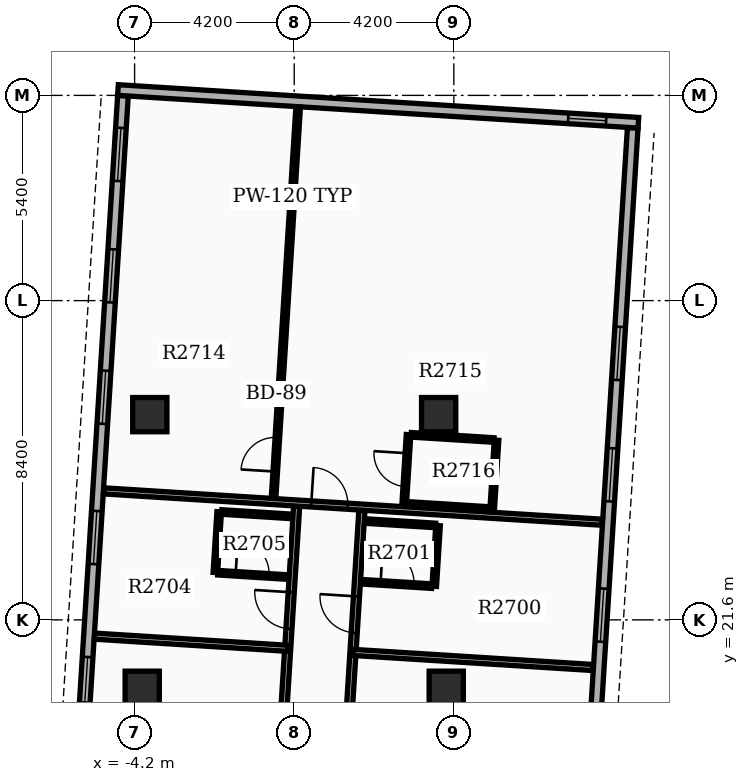
"""IFC4 building model, lengths in metres.
Left out: names, types, materials, properties, quantities, classifications, styles, units other than length and angle.
Written with IfcOpenShell. Run it as: python <this file> out.ifc"""

import sys

from ifc_helpers import new_model, si_unit, direction, frame, frame_2d, origin, origin_2d, place, context, subcontext, project, spatial, rectangle, extrude, element, fill, save


model = new_model("IFC4")
c1 = context("Model", 3, precision=1e-05, world=origin(), true_north=direction((0.0, 1.0)))
c2 = subcontext(c1, "Body", "Model", "MODEL_VIEW")
j1 = project(units=[si_unit("LENGTHUNIT", "METRE"), si_unit("PLANEANGLEUNIT", "RADIAN")], contexts=[c1])
p1 = place(None, origin())
s1 = spatial("IfcSite", under=j1, at=p1, CompositionType="ELEMENT")
p2 = place(p1, origin())
s2 = spatial("IfcBuilding", under=s1, at=p2, CompositionType="ELEMENT")
p3 = place(p2, frame((0.0, 0.0, 168.3)))
s3 = spatial("IfcBuildingStorey", under=s2, at=p3, CompositionType="ELEMENT", Elevation=168.3)
for number, where, z_axis, x_axis in (
    (1, (-4.0, 19.8, 0.0), (0.0, 0.0, 1.0), (1.0, 0.0, 0.0)),
    (2, (4.0, 19.8, 0.0), (0.0, 0.0, 1.0), (1.0, 0.0, 0.0)),
    (3, (-3.8, 27.0, 0.0), (0.0, 0.0, 1.0), (1.0, 0.0, 0.0)),
    (4, (3.8, 27.0, 0.0), (0.0, 0.0, 1.0), (1.0, 0.0, 0.0)),
):
    element("IfcColumn", number, at=place(p3, frame(where, z_axis=z_axis, x_axis=x_axis)), inside=s3, PredefinedType="COLUMN", context=c2, shape_type="SweptSolid", body=[
        extrude(rectangle(XDim=0.9, YDim=0.9, at=origin_2d()), origin(), (0.0, 0.0, 1.0), 3.9),
    ])
p4 = place(p3, frame((7.645, 14.489, 0.0), z_axis=(0.0, 0.0, 1.0), x_axis=(0.06279645424, 0.99802635503, 0.0)))
e5 = element("IfcWall", 5, at=p4, inside=s3, PredefinedType="STANDARD", context=c2, shape_type="SweptSolid", body=[
    extrude(rectangle(XDim=20.1, YDim=0.28, at=frame_2d((10.05, 0.0))), origin(), (0.0, 0.0, 1.0), 2.97),
])
p5 = place(p4, frame((0.85, 0.0, 0.8)))
e6 = element("IfcOpeningElement", 6, at=p5, cuts=e5, PredefinedType="OPENING", context=c2, shape_type="SweptSolid", body=[
    extrude(rectangle(XDim=1.4, YDim=1.6, at=frame_2d((0.7, 0.8))), frame((0.0, 0.15, 0.0), z_axis=(0.0, -1.0, 0.0), x_axis=(1.0, 0.0, 0.0)), (0.0, 0.0, 1.0), 0.3),
])
p6 = place(p4, frame((6.55, 0.0, 0.8)))
e7 = element("IfcOpeningElement", 7, at=p6, cuts=e5, PredefinedType="OPENING", context=c2, shape_type="SweptSolid", body=[
    extrude(rectangle(XDim=1.4, YDim=1.6, at=frame_2d((0.7, 0.8))), frame((0.0, 0.15, 0.0), z_axis=(0.0, -1.0, 0.0), x_axis=(1.0, 0.0, 0.0)), (0.0, 0.0, 1.0), 0.3),
])
p7 = place(p4, frame((10.25, 0.0, 0.8)))
e8 = element("IfcOpeningElement", 8, at=p7, cuts=e5, PredefinedType="OPENING", context=c2, shape_type="SweptSolid", body=[
    extrude(rectangle(XDim=1.4, YDim=1.6, at=frame_2d((0.7, 0.8))), frame((0.0, 0.15, 0.0), z_axis=(0.0, -1.0, 0.0), x_axis=(1.0, 0.0, 0.0)), (0.0, 0.0, 1.0), 0.3),
])
p8 = place(p4, frame((13.45, 0.0, 0.8)))
e9 = element("IfcOpeningElement", 9, at=p8, cuts=e5, PredefinedType="OPENING", context=c2, shape_type="SweptSolid", body=[
    extrude(rectangle(XDim=1.4, YDim=1.6, at=frame_2d((0.7, 0.8))), frame((0.0, 0.15, 0.0), z_axis=(0.0, -1.0, 0.0), x_axis=(1.0, 0.0, 0.0)), (0.0, 0.0, 1.0), 0.3),
])
p9 = place(p3, frame((-4.507, 35.393, 0.0), z_axis=(0.0, 0.0, 1.0), x_axis=(-0.062784355807, -0.998027116198, 0.0)))
e10 = element("IfcWall", 10, at=p9, inside=s3, PredefinedType="STANDARD", context=c2, shape_type="SweptSolid", body=[
    extrude(rectangle(XDim=20.1, YDim=0.28, at=frame_2d((10.05, 0.0))), origin(), (0.0, 0.0, 1.0), 2.97),
])
p10 = place(p9, frame((0.85, 0.0, 0.8)))
e11 = element("IfcOpeningElement", 11, at=p10, cuts=e10, PredefinedType="OPENING", context=c2, shape_type="SweptSolid", body=[
    extrude(rectangle(XDim=1.4, YDim=1.6, at=frame_2d((0.7, 0.8))), frame((0.0, 0.15, 0.0), z_axis=(0.0, -1.0, 0.0), x_axis=(1.0, 0.0, 0.0)), (0.0, 0.0, 1.0), 0.3),
])
p11 = place(p9, frame((4.05, 0.0, 0.8)))
e12 = element("IfcOpeningElement", 12, at=p11, cuts=e10, PredefinedType="OPENING", context=c2, shape_type="SweptSolid", body=[
    extrude(rectangle(XDim=1.4, YDim=1.6, at=frame_2d((0.7, 0.8))), frame((0.0, 0.15, 0.0), z_axis=(0.0, -1.0, 0.0), x_axis=(1.0, 0.0, 0.0)), (0.0, 0.0, 1.0), 0.3),
])
p12 = place(p9, frame((7.25, 0.0, 0.8)))
e13 = element("IfcOpeningElement", 13, at=p12, cuts=e10, PredefinedType="OPENING", context=c2, shape_type="SweptSolid", body=[
    extrude(rectangle(XDim=1.4, YDim=1.6, at=frame_2d((0.7, 0.8))), frame((0.0, 0.15, 0.0), z_axis=(0.0, -1.0, 0.0), x_axis=(1.0, 0.0, 0.0)), (0.0, 0.0, 1.0), 0.3),
])
p13 = place(p9, frame((10.95, 0.0, 0.8)))
e14 = element("IfcOpeningElement", 14, at=p13, cuts=e10, PredefinedType="OPENING", context=c2, shape_type="SweptSolid", body=[
    extrude(rectangle(XDim=1.4, YDim=1.6, at=frame_2d((0.7, 0.8))), frame((0.0, 0.15, 0.0), z_axis=(0.0, -1.0, 0.0), x_axis=(1.0, 0.0, 0.0)), (0.0, 0.0, 1.0), 0.3),
])
p14 = place(p9, frame((14.799, 0.0, 0.85)))
e15 = element("IfcOpeningElement", 15, at=p14, cuts=e10, PredefinedType="OPENING", context=c2, shape_type="SweptSolid", body=[
    extrude(rectangle(XDim=1.2, YDim=1.6, at=frame_2d((0.6, 0.8))), frame((0.0, 0.15, 0.0), z_axis=(0.0, -1.0, 0.0), x_axis=(1.0, 0.0, 0.0)), (0.0, 0.0, 1.0), 0.3),
])
p15 = place(p3, frame((9.055, 34.68, 0.0), z_axis=(0.0, 0.0, 1.0), x_axis=(-0.998026318072, 0.062797041623, 0.0)))
e16 = element("IfcWall", 16, at=p15, inside=s3, PredefinedType="STANDARD", context=c2, shape_type="SweptSolid", body=[
    extrude(rectangle(XDim=13.72, YDim=0.28, at=frame_2d((6.86, 0.0))), origin(), (0.0, 0.0, 1.0), 2.97),
])
p16 = place(p15, frame((0.85, 0.0, 0.85)))
e17 = element("IfcOpeningElement", 17, at=p16, cuts=e16, PredefinedType="OPENING", context=c2, shape_type="SweptSolid", body=[
    extrude(rectangle(XDim=1.0, YDim=1.5, at=frame_2d((0.5, 0.75))), frame((0.0, 0.15, 0.0), z_axis=(0.0, -1.0, 0.0), x_axis=(1.0, 0.0, 0.0)), (0.0, 0.0, 1.0), 0.3),
])
p17 = place(p3, frame((1.172, 14.806, 0.0), z_axis=(0.0, 0.0, 1.0), x_axis=(0.062771584278, 0.998027919553, 0.0)))
e18 = element("IfcWall", 18, at=p17, inside=s3, PredefinedType="PARTITIONING", context=c2, shape_type="SweptSolid", body=[
    extrude(rectangle(XDim=9.7, YDim=0.16, at=frame_2d((4.85, 0.0))), origin(), (0.0, 0.0, 1.0), 2.96),
])
p18 = place(p17, frame((2.575, 0.0, 0.0)))
e19 = element("IfcOpeningElement", 19, at=p18, cuts=e18, PredefinedType="OPENING", context=c2, shape_type="SweptSolid", body=[
    extrude(rectangle(XDim=0.96, YDim=2.15, at=frame_2d((0.48, 1.075))), frame((0.0, 0.09, 0.0), z_axis=(0.0, -1.0, 0.0), x_axis=(1.0, 0.0, 0.0)), (0.0, 0.0, 1.0), 0.18),
])
p19 = place(p17, frame((6.467, 0.0, 0.0)))
e20 = element("IfcOpeningElement", 20, at=p19, cuts=e18, PredefinedType="OPENING", context=c2, shape_type="SweptSolid", body=[
    extrude(rectangle(XDim=0.96, YDim=2.15, at=frame_2d((0.48, 1.075))), frame((0.0, 0.09, 0.0), z_axis=(0.0, -1.0, 0.0), x_axis=(1.0, 0.0, 0.0)), (0.0, 0.0, 1.0), 0.18),
])
p20 = place(p3, frame((1.546, 20.744, 0.0), z_axis=(0.0, 0.0, 1.0), x_axis=(0.998025479614, -0.06281036572, 0.0)))
e21 = element("IfcWall", 21, at=p20, inside=s3, PredefinedType="PARTITIONING", context=c2, shape_type="SweptSolid", body=[
    extrude(rectangle(XDim=6.332, YDim=0.16, at=frame_2d((3.166, 0.0))), origin(), (0.0, 0.0, 1.0), 2.96),
])
p21 = place(p3, frame((1.803, 22.601, 0.0), z_axis=(0.0, 0.0, 1.0), x_axis=(0.998027443946, -0.062779145668, 0.0)))
e22 = element("IfcWall", 22, at=p21, inside=s3, PredefinedType="PARTITIONING", context=c2, shape_type="SweptSolid", body=[
    extrude(rectangle(XDim=1.82, YDim=0.12, at=frame_2d((0.91, 0.0))), origin(), (0.0, 0.0, 1.0), 2.96),
])
p22 = place(p21, frame((0.47, 0.0, 0.0)))
e23 = element("IfcOpeningElement", 23, at=p22, cuts=e22, PredefinedType="OPENING", context=c2, shape_type="SweptSolid", body=[
    extrude(rectangle(XDim=0.88, YDim=2.1, at=frame_2d((0.44, 1.05))), frame((0.0, 0.07, 0.0), z_axis=(0.0, -1.0, 0.0), x_axis=(1.0, 0.0, 0.0)), (0.0, 0.0, 1.0), 0.14),
])
p23 = place(p3, frame((1.903, 24.198, 0.0), z_axis=(0.0, 0.0, 1.0), x_axis=(0.998026915151, -0.062787551592, 0.0)))
e24 = element("IfcWall", 24, at=p23, inside=s3, PredefinedType="PARTITIONING", context=c2, shape_type="SweptSolid", body=[
    extrude(rectangle(XDim=1.82, YDim=0.12, at=frame_2d((0.91, 0.0))), origin(), (0.0, 0.0, 1.0), 2.96),
])
p24 = place(p3, frame((3.684, 22.483, 0.0), z_axis=(0.0, 0.0, 1.0), x_axis=(0.06271075472, 0.998031743605, 0.0)))
e25 = element("IfcWall", 25, at=p24, inside=s3, PredefinedType="PARTITIONING", context=c2, shape_type="SweptSolid", body=[
    extrude(rectangle(XDim=1.6, YDim=0.12, at=frame_2d((0.8, 0.0))), origin(), (0.0, 0.0, 1.0), 2.96),
])
p25 = place(p3, frame((-0.545, 14.914, 0.0), z_axis=(0.0, 0.0, 1.0), x_axis=(0.062796654085, 0.998026342456, 0.0)))
e26 = element("IfcWall", 26, at=p25, inside=s3, PredefinedType="PARTITIONING", context=c2, shape_type="SweptSolid", body=[
    extrude(rectangle(XDim=9.7, YDim=0.16, at=frame_2d((4.85, 0.0))), origin(), (0.0, 0.0, 1.0), 2.96),
])
p26 = place(p25, frame((2.575, 0.0, 0.0)))
e27 = element("IfcOpeningElement", 27, at=p26, cuts=e26, PredefinedType="OPENING", context=c2, shape_type="SweptSolid", body=[
    extrude(rectangle(XDim=0.96, YDim=2.15, at=frame_2d((0.48, 1.075))), frame((0.0, 0.09, 0.0), z_axis=(0.0, -1.0, 0.0), x_axis=(1.0, 0.0, 0.0)), (0.0, 0.0, 1.0), 0.18),
])
p27 = place(p25, frame((6.467, 0.0, 0.0)))
e28 = element("IfcOpeningElement", 28, at=p27, cuts=e26, PredefinedType="OPENING", context=c2, shape_type="SweptSolid", body=[
    extrude(rectangle(XDim=0.96, YDim=2.15, at=frame_2d((0.48, 1.075))), frame((0.0, 0.09, 0.0), z_axis=(0.0, -1.0, 0.0), x_axis=(1.0, 0.0, 0.0)), (0.0, 0.0, 1.0), 0.18),
])
p28 = place(p3, frame((-0.171, 20.852, 0.0), z_axis=(0.0, 0.0, 1.0), x_axis=(-0.998025621735, 0.06280810744, 0.0)))
e29 = element("IfcWall", 29, at=p28, inside=s3, PredefinedType="PARTITIONING", context=c2, shape_type="SweptSolid", body=[
    extrude(rectangle(XDim=5.092, YDim=0.16, at=frame_2d((2.546, 0.0))), origin(), (0.0, 0.0, 1.0), 2.96),
])
p29 = place(p3, frame((-2.01, 22.841, 0.0), z_axis=(0.0, 0.0, 1.0), x_axis=(0.998027443946, -0.062779145668, 0.0)))
e30 = element("IfcWall", 30, at=p29, inside=s3, PredefinedType="PARTITIONING", context=c2, shape_type="SweptSolid", body=[
    extrude(rectangle(XDim=1.82, YDim=0.12, at=frame_2d((0.91, 0.0))), origin(), (0.0, 0.0, 1.0), 2.96),
])
p30 = place(p29, frame((0.47, 0.0, 0.0)))
e31 = element("IfcOpeningElement", 31, at=p30, cuts=e30, PredefinedType="OPENING", context=c2, shape_type="SweptSolid", body=[
    extrude(rectangle(XDim=0.88, YDim=2.1, at=frame_2d((0.44, 1.05))), frame((0.0, 0.07, 0.0), z_axis=(0.0, -1.0, 0.0), x_axis=(1.0, 0.0, 0.0)), (0.0, 0.0, 1.0), 0.14),
])
p31 = place(p3, frame((-1.909, 24.438, 0.0), z_axis=(0.0, 0.0, 1.0), x_axis=(0.998026915151, -0.062787551592, 0.0)))
e32 = element("IfcWall", 32, at=p31, inside=s3, PredefinedType="PARTITIONING", context=c2, shape_type="SweptSolid", body=[
    extrude(rectangle(XDim=1.82, YDim=0.12, at=frame_2d((0.91, 0.0))), origin(), (0.0, 0.0, 1.0), 2.96),
])
p32 = place(p3, frame((-2.075, 22.845, 0.0), z_axis=(0.0, 0.0, 1.0), x_axis=(0.062862733403, 0.998022182494, 0.0)))
e33 = element("IfcWall", 33, at=p32, inside=s3, PredefinedType="PARTITIONING", context=c2, shape_type="SweptSolid", body=[
    extrude(rectangle(XDim=1.6, YDim=0.12, at=frame_2d((0.8, 0.0))), origin(), (0.0, 0.0, 1.0), 2.96),
])
p33 = place(p3, frame((-5.012, 24.994, 0.0), z_axis=(0.0, 0.0, 1.0), x_axis=(0.998026109115, -0.062800362452, 0.0)))
e34 = element("IfcWall", 34, at=p33, inside=s3, PredefinedType="PARTITIONING", context=c2, shape_type="SweptSolid", body=[
    extrude(rectangle(XDim=13.144, YDim=0.16, at=frame_2d((6.572, 0.0))), origin(), (0.0, 0.0, 1.0), 2.96),
])
p34 = place(p33, frame((5.472, 0.0, 0.0)))
e35 = element("IfcOpeningElement", 35, at=p34, cuts=e34, PredefinedType="OPENING", context=c2, shape_type="SweptSolid", body=[
    extrude(rectangle(XDim=0.96, YDim=2.15, at=frame_2d((0.48, 1.075))), frame((0.0, 0.09, 0.0), z_axis=(0.0, -1.0, 0.0), x_axis=(1.0, 0.0, 0.0)), (0.0, 0.0, 1.0), 0.18),
])
p35 = place(p3, frame((-0.544, 24.803, 0.0), z_axis=(0.0, 0.0, 1.0), x_axis=(0.062786562543, 0.998026977373, 0.0)))
e36 = element("IfcWall", 36, at=p35, inside=s3, PredefinedType="PARTITIONING", context=c2, shape_type="SweptSolid", body=[
    extrude(rectangle(XDim=10.312, YDim=0.12, at=frame_2d((5.156, 0.0))), origin(), (0.0, 0.0, 1.0), 2.96),
])
p36 = place(p35, frame((0.7, 0.0, 0.0)))
e37 = element("IfcOpeningElement", 37, at=p36, cuts=e36, PredefinedType="OPENING", context=c2, shape_type="SweptSolid", body=[
    extrude(rectangle(XDim=0.9, YDim=2.1, at=frame_2d((0.45, 1.05))), frame((0.0, 0.07, 0.0), z_axis=(0.0, -1.0, 0.0), x_axis=(1.0, 0.0, 0.0)), (0.0, 0.0, 1.0), 0.14),
])
p37 = place(p3, frame((2.894, 24.657, 0.0), z_axis=(0.0, 0.0, 1.0), x_axis=(0.062912758763, 0.998019030272, 0.0)))
e38 = element("IfcWall", 38, at=p37, inside=s3, PredefinedType="PARTITIONING", context=c2, shape_type="SweptSolid", body=[
    extrude(rectangle(XDim=1.82, YDim=0.12, at=frame_2d((0.91, 0.0))), origin(), (0.0, 0.0, 1.0), 2.96),
])
p38 = place(p37, frame((0.45, 0.0, 0.0)))
e39 = element("IfcOpeningElement", 39, at=p38, cuts=e38, PredefinedType="OPENING", context=c2, shape_type="SweptSolid", body=[
    extrude(rectangle(XDim=0.88, YDim=2.1, at=frame_2d((0.44, 1.05))), frame((0.0, 0.07, 0.0), z_axis=(0.0, -1.0, 0.0), x_axis=(1.0, 0.0, 0.0)), (0.0, 0.0, 1.0), 0.14),
])
p39 = place(p3, frame((5.209, 24.511, 0.0), z_axis=(0.0, 0.0, 1.0), x_axis=(0.062645529196, 0.998035839873, 0.0)))
e40 = element("IfcWall", 40, at=p39, inside=s3, PredefinedType="PARTITIONING", context=c2, shape_type="SweptSolid", body=[
    extrude(rectangle(XDim=1.82, YDim=0.12, at=frame_2d((0.91, 0.0))), origin(), (0.0, 0.0, 1.0), 2.96),
])
p40 = place(p3, frame((2.964, 24.653, 0.0), z_axis=(0.0, 0.0, 1.0), x_axis=(0.99802414895, -0.06283150573, 0.0)))
e41 = element("IfcWall", 41, at=p40, inside=s3, PredefinedType="PARTITIONING", context=c2, shape_type="SweptSolid", body=[
    extrude(rectangle(XDim=2.18, YDim=0.12, at=frame_2d((1.09, 0.0))), origin(), (0.0, 0.0, 1.0), 2.96),
])
p41 = place(p3, frame((3.078, 26.469, 0.0), z_axis=(0.0, 0.0, 1.0), x_axis=(0.998024591026, -0.062824483344, 0.0)))
e42 = element("IfcWall", 42, at=p41, inside=s3, PredefinedType="PARTITIONING", context=c2, shape_type="SweptSolid", body=[
    extrude(rectangle(XDim=2.18, YDim=0.12, at=frame_2d((1.09, 0.0))), origin(), (0.0, 0.0, 1.0), 2.96),
])
p42 = place(p6, origin())
e43 = element("IfcWindow", 43, at=p42, inside=s3, PartitioningType="SINGLE_PANEL", PredefinedType="WINDOW", context=c2, shape_type="SweptSolid", body=[
    extrude(rectangle(XDim=1.4, YDim=1.6, at=frame_2d((0.7, 0.8))), frame((0.0, 0.03, 0.0), z_axis=(0.0, -1.0, 0.0), x_axis=(1.0, 0.0, 0.0)), (0.0, 0.0, 1.0), 0.06),
])
fill(e7, e43)
p43 = place(p7, origin())
e44 = element("IfcWindow", 44, at=p43, inside=s3, PartitioningType="SINGLE_PANEL", PredefinedType="WINDOW", context=c2, shape_type="SweptSolid", body=[
    extrude(rectangle(XDim=1.4, YDim=1.6, at=frame_2d((0.7, 0.8))), frame((0.0, 0.03, 0.0), z_axis=(0.0, -1.0, 0.0), x_axis=(1.0, 0.0, 0.0)), (0.0, 0.0, 1.0), 0.06),
])
fill(e8, e44)
p44 = place(p8, origin())
e45 = element("IfcWindow", 45, at=p44, inside=s3, PartitioningType="SINGLE_PANEL", PredefinedType="WINDOW", context=c2, shape_type="SweptSolid", body=[
    extrude(rectangle(XDim=1.4, YDim=1.6, at=frame_2d((0.7, 0.8))), frame((0.0, 0.03, 0.0), z_axis=(0.0, -1.0, 0.0), x_axis=(1.0, 0.0, 0.0)), (0.0, 0.0, 1.0), 0.06),
])
fill(e9, e45)
p45 = place(p10, origin())
e46 = element("IfcWindow", 46, at=p45, inside=s3, PartitioningType="SINGLE_PANEL", PredefinedType="WINDOW", context=c2, shape_type="SweptSolid", body=[
    extrude(rectangle(XDim=1.4, YDim=1.6, at=frame_2d((0.7, 0.8))), frame((0.0, 0.03, 0.0), z_axis=(0.0, -1.0, 0.0), x_axis=(1.0, 0.0, 0.0)), (0.0, 0.0, 1.0), 0.06),
])
fill(e11, e46)
p46 = place(p11, origin())
e47 = element("IfcWindow", 47, at=p46, inside=s3, PartitioningType="SINGLE_PANEL", PredefinedType="WINDOW", context=c2, shape_type="SweptSolid", body=[
    extrude(rectangle(XDim=1.4, YDim=1.6, at=frame_2d((0.7, 0.8))), frame((0.0, 0.03, 0.0), z_axis=(0.0, -1.0, 0.0), x_axis=(1.0, 0.0, 0.0)), (0.0, 0.0, 1.0), 0.06),
])
fill(e12, e47)
p47 = place(p12, origin())
e48 = element("IfcWindow", 48, at=p47, inside=s3, PartitioningType="SINGLE_PANEL", PredefinedType="WINDOW", context=c2, shape_type="SweptSolid", body=[
    extrude(rectangle(XDim=1.4, YDim=1.6, at=frame_2d((0.7, 0.8))), frame((0.0, 0.03, 0.0), z_axis=(0.0, -1.0, 0.0), x_axis=(1.0, 0.0, 0.0)), (0.0, 0.0, 1.0), 0.06),
])
fill(e13, e48)
p48 = place(p13, origin())
e49 = element("IfcWindow", 49, at=p48, inside=s3, PartitioningType="SINGLE_PANEL", PredefinedType="WINDOW", context=c2, shape_type="SweptSolid", body=[
    extrude(rectangle(XDim=1.4, YDim=1.6, at=frame_2d((0.7, 0.8))), frame((0.0, 0.03, 0.0), z_axis=(0.0, -1.0, 0.0), x_axis=(1.0, 0.0, 0.0)), (0.0, 0.0, 1.0), 0.06),
])
fill(e14, e49)
p49 = place(p16, origin())
e50 = element("IfcWindow", 50, at=p49, inside=s3, PartitioningType="SINGLE_PANEL", PredefinedType="WINDOW", context=c2, shape_type="SweptSolid", body=[
    extrude(rectangle(XDim=1.0, YDim=1.5, at=frame_2d((0.5, 0.75))), frame((0.0, 0.03, 0.0), z_axis=(0.0, -1.0, 0.0), x_axis=(1.0, 0.0, 0.0)), (0.0, 0.0, 1.0), 0.06),
])
fill(e17, e50)
p50 = place(p14, origin())
e51 = element("IfcWindow", 51, at=p50, inside=s3, PartitioningType="SINGLE_PANEL", PredefinedType="WINDOW", context=c2, shape_type="SweptSolid", body=[
    extrude(rectangle(XDim=1.2, YDim=1.6, at=frame_2d((0.6, 0.8))), frame((0.0, 0.03, 0.0), z_axis=(0.0, -1.0, 0.0), x_axis=(1.0, 0.0, 0.0)), (0.0, 0.0, 1.0), 0.06),
])
fill(e15, e51)
p51 = place(p19, origin())
e52 = element("IfcDoor", 52, at=p51, inside=s3, OperationType="SINGLE_SWING_RIGHT", PredefinedType="DOOR", context=c2, shape_type="SweptSolid", body=[
    extrude(rectangle(XDim=0.96, YDim=2.15, at=frame_2d((0.48, 1.075))), frame((0.0, 0.025, 0.0), z_axis=(0.0, -1.0, 0.0), x_axis=(1.0, 0.0, 0.0)), (0.0, 0.0, 1.0), 0.05),
])
fill(e20, e52)
p52 = place(p22, origin())
e53 = element("IfcDoor", 53, at=p52, inside=s3, OperationType="SINGLE_SWING_LEFT", PredefinedType="DOOR", context=c2, shape_type="SweptSolid", body=[
    extrude(rectangle(XDim=0.88, YDim=2.1, at=frame_2d((0.44, 1.05))), frame((0.0, 0.025, 0.0), z_axis=(0.0, -1.0, 0.0), x_axis=(1.0, 0.0, 0.0)), (0.0, 0.0, 1.0), 0.05),
])
fill(e23, e53)
p53 = place(p27, origin())
e54 = element("IfcDoor", 54, at=p53, inside=s3, OperationType="SINGLE_SWING_RIGHT", PredefinedType="DOOR", context=c2, shape_type="SweptSolid", body=[
    extrude(rectangle(XDim=0.96, YDim=2.15, at=frame_2d((0.48, 1.075))), frame((0.0, 0.025, 0.0), z_axis=(0.0, -1.0, 0.0), x_axis=(1.0, 0.0, 0.0)), (0.0, 0.0, 1.0), 0.05),
])
fill(e28, e54)
p54 = place(p30, origin())
e55 = element("IfcDoor", 55, at=p54, inside=s3, OperationType="SINGLE_SWING_LEFT", PredefinedType="DOOR", context=c2, shape_type="SweptSolid", body=[
    extrude(rectangle(XDim=0.88, YDim=2.1, at=frame_2d((0.44, 1.05))), frame((0.0, 0.025, 0.0), z_axis=(0.0, -1.0, 0.0), x_axis=(1.0, 0.0, 0.0)), (0.0, 0.0, 1.0), 0.05),
])
fill(e31, e55)
p55 = place(p34, origin())
e56 = element("IfcDoor", 56, at=p55, inside=s3, OperationType="SINGLE_SWING_LEFT", PredefinedType="DOOR", context=c2, shape_type="SweptSolid", body=[
    extrude(rectangle(XDim=0.96, YDim=2.15, at=frame_2d((0.48, 1.075))), frame((0.0, 0.025, 0.0), z_axis=(0.0, -1.0, 0.0), x_axis=(1.0, 0.0, 0.0)), (0.0, 0.0, 1.0), 0.05),
])
fill(e35, e56)
p56 = place(p36, origin())
e57 = element("IfcDoor", 57, at=p56, inside=s3, OperationType="SINGLE_SWING_LEFT", PredefinedType="DOOR", context=c2, shape_type="SweptSolid", body=[
    extrude(rectangle(XDim=0.9, YDim=2.1, at=frame_2d((0.45, 1.05))), frame((0.0, 0.025, 0.0), z_axis=(0.0, -1.0, 0.0), x_axis=(1.0, 0.0, 0.0)), (0.0, 0.0, 1.0), 0.05),
])
fill(e37, e57)
p57 = place(p38, origin())
e58 = element("IfcDoor", 58, at=p57, inside=s3, OperationType="SINGLE_SWING_RIGHT", PredefinedType="DOOR", context=c2, shape_type="SweptSolid", body=[
    extrude(rectangle(XDim=0.88, YDim=2.1, at=frame_2d((0.44, 1.05))), frame((0.0, 0.025, 0.0), z_axis=(0.0, -1.0, 0.0), x_axis=(1.0, 0.0, 0.0)), (0.0, 0.0, 1.0), 0.05),
])
fill(e39, e58)
save(model, sys.argv[1])
